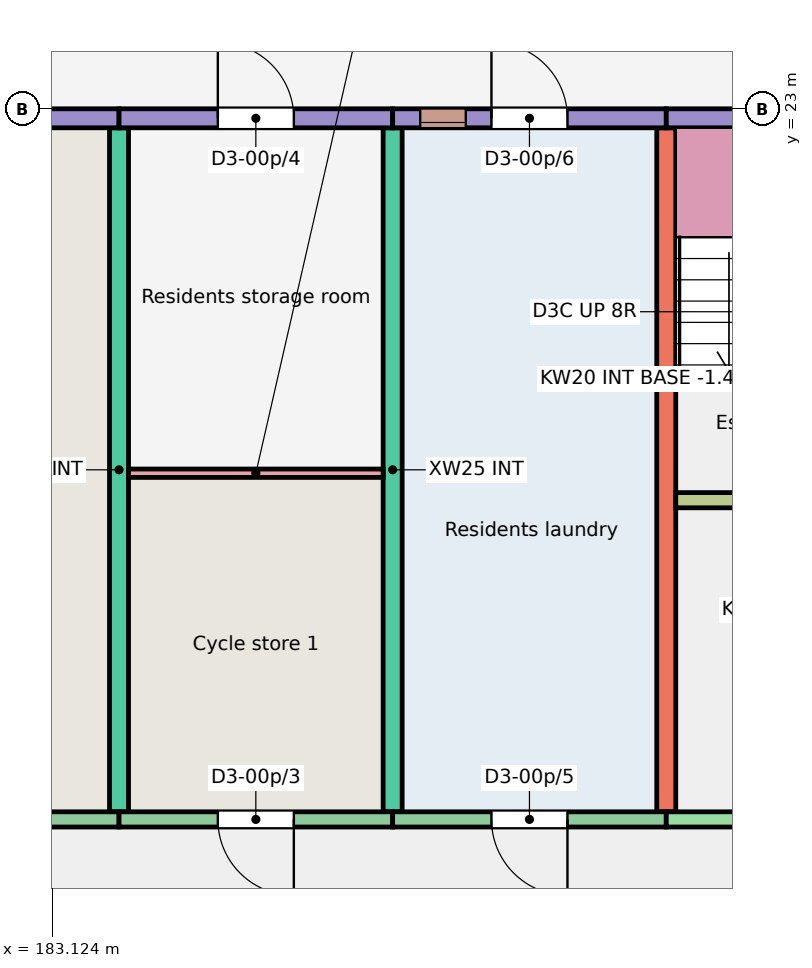
"""IFC4 building model, lengths in metres.
Left out: names, types, materials, properties, quantities, classifications, styles, units other than length and angle.
Written with IfcOpenShell. Run it as: python <this file> out.ifc"""

import sys

from ifc_helpers import new_model, si_unit, direction, frame, frame_2d, origin, place, context, subcontext, project, spatial, rectangle, extrude, element, fill, save


model = new_model("IFC4")
c1 = context("Model", 3, precision=1e-05, world=origin(), true_north=direction((0.0, 1.0)))
c2 = subcontext(c1, "Body", "Model", "MODEL_VIEW")
j1 = project(units=[si_unit("LENGTHUNIT", "METRE"), si_unit("PLANEANGLEUNIT", "RADIAN")], contexts=[c1])
p1 = place(None, origin())
s1 = spatial("IfcSite", under=j1, at=p1, CompositionType="ELEMENT")
p2 = place(p1, origin())
s2 = spatial("IfcBuilding", under=s1, at=p2, CompositionType="ELEMENT")
p3 = place(p2, origin())
s3 = spatial("IfcBuildingStorey", under=s2, at=p3, CompositionType="ELEMENT", Elevation=0.0)
for number, where, z_axis, x_axis in (
    (1, (184.0, 13.75, -0.25), (0.0, 0.0, 1.0), (0.0, 1.0, 0.0)),
    (2, (187.6, 13.75, -0.25), (0.0, 0.0, 1.0), (0.0, 1.0, 0.0)),
    (3, (191.2, 13.75, -0.25), (0.0, 0.0, 1.0), (0.0, 1.0, 0.0)),
):
    element("IfcWall", number, at=place(p3, frame(where, z_axis=z_axis, x_axis=x_axis)), inside=s3, PredefinedType="SHEAR", context=c2, shape_type="SweptSolid", body=[
        extrude(rectangle(XDim=9.0, YDim=0.25, at=frame_2d((4.5, 0.0))), origin(), (0.0, 0.0, 1.0), 3.25),
    ])
p4 = place(p3, frame((180.4, 22.875, -0.25), z_axis=(0.0, 0.0, 1.0), x_axis=(1.0, 0.0, 0.0)))
e4 = element("IfcWall", 4, at=p4, inside=s3, PredefinedType="SOLIDWALL", context=c2, shape_type="SweptSolid", body=[
    extrude(rectangle(XDim=3.6, YDim=0.25, at=frame_2d((1.8, 0.0))), origin(), (0.0, 0.0, 1.0), 3.25),
])
p5 = place(p4, frame((1.312, 0.0, 0.25)))
e5 = element("IfcOpeningElement", 5, at=p5, cuts=e4, PredefinedType="OPENING", context=c2, shape_type="SweptSolid", body=[
    extrude(rectangle(XDim=1.0, YDim=2.1, at=frame_2d((0.5, 1.05))), frame((0.0, 0.135, 0.0), z_axis=(0.0, -1.0, 0.0), x_axis=(1.0, 0.0, 0.0)), (0.0, 0.0, 1.0), 0.27),
])
p6 = place(p3, frame((180.55, 13.65, -0.25), z_axis=(0.0, 0.0, 1.0), x_axis=(1.0, 0.0, 0.0)))
e6 = element("IfcWall", 6, at=p6, inside=s3, PredefinedType="SOLIDWALL", context=c2, shape_type="SweptSolid", body=[
    extrude(rectangle(XDim=3.45, YDim=0.2, at=frame_2d((1.725, 0.0))), origin(), (0.0, 0.0, 1.0), 3.25),
])
p7 = place(p6, frame((1.163, 0.0, 0.25)))
e7 = element("IfcOpeningElement", 7, at=p7, cuts=e6, PredefinedType="OPENING", context=c2, shape_type="SweptSolid", body=[
    extrude(rectangle(XDim=1.0, YDim=2.1, at=frame_2d((0.5, 1.05))), frame((0.0, 0.11, 0.0), z_axis=(0.0, -1.0, 0.0), x_axis=(1.0, 0.0, 0.0)), (0.0, 0.0, 1.0), 0.22),
])
p8 = place(p3, frame((184.0, 22.875, -0.25), z_axis=(0.0, 0.0, 1.0), x_axis=(1.0, 0.0, 0.0)))
e8 = element("IfcWall", 8, at=p8, inside=s3, PredefinedType="SOLIDWALL", context=c2, shape_type="SweptSolid", body=[
    extrude(rectangle(XDim=3.6, YDim=0.25, at=frame_2d((1.8, 0.0))), origin(), (0.0, 0.0, 1.0), 3.25),
])
p9 = place(p8, frame((1.3, 0.0, 0.25)))
e9 = element("IfcOpeningElement", 9, at=p9, cuts=e8, PredefinedType="OPENING", context=c2, shape_type="SweptSolid", body=[
    extrude(rectangle(XDim=1.0, YDim=2.1, at=frame_2d((0.5, 1.05))), frame((0.0, 0.135, 0.0), z_axis=(0.0, -1.0, 0.0), x_axis=(1.0, 0.0, 0.0)), (0.0, 0.0, 1.0), 0.27),
])
p10 = place(p3, frame((184.0, 13.65, -0.25), z_axis=(0.0, 0.0, 1.0), x_axis=(1.0, 0.0, 0.0)))
e10 = element("IfcWall", 10, at=p10, inside=s3, PredefinedType="SOLIDWALL", context=c2, shape_type="SweptSolid", body=[
    extrude(rectangle(XDim=3.6, YDim=0.2, at=frame_2d((1.8, 0.0))), origin(), (0.0, 0.0, 1.0), 3.25),
])
p11 = place(p10, frame((1.3, 0.0, 0.25)))
e11 = element("IfcOpeningElement", 11, at=p11, cuts=e10, PredefinedType="OPENING", context=c2, shape_type="SweptSolid", body=[
    extrude(rectangle(XDim=1.0, YDim=2.1, at=frame_2d((0.5, 1.05))), frame((0.0, 0.11, 0.0), z_axis=(0.0, -1.0, 0.0), x_axis=(1.0, 0.0, 0.0)), (0.0, 0.0, 1.0), 0.22),
])
p12 = place(p3, frame((187.6, 22.875, -0.25), z_axis=(0.0, 0.0, 1.0), x_axis=(1.0, 0.0, 0.0)))
e12 = element("IfcWall", 12, at=p12, inside=s3, PredefinedType="SOLIDWALL", context=c2, shape_type="SweptSolid", body=[
    extrude(rectangle(XDim=3.6, YDim=0.25, at=frame_2d((1.8, 0.0))), origin(), (0.0, 0.0, 1.0), 3.25),
])
p13 = place(p12, frame((0.363, 0.0, 2.05)))
e13 = element("IfcOpeningElement", 13, at=p13, cuts=e12, PredefinedType="OPENING", context=c2, shape_type="SweptSolid", body=[
    extrude(rectangle(XDim=0.6, YDim=0.6, at=frame_2d((0.3, 0.3))), frame((0.0, 0.135, 0.0), z_axis=(0.0, -1.0, 0.0), x_axis=(1.0, 0.0, 0.0)), (0.0, 0.0, 1.0), 0.27),
])
p14 = place(p12, frame((1.3, 0.0, 0.25)))
e14 = element("IfcOpeningElement", 14, at=p14, cuts=e12, PredefinedType="OPENING", context=c2, shape_type="SweptSolid", body=[
    extrude(rectangle(XDim=1.0, YDim=2.1, at=frame_2d((0.5, 1.05))), frame((0.0, 0.135, 0.0), z_axis=(0.0, -1.0, 0.0), x_axis=(1.0, 0.0, 0.0)), (0.0, 0.0, 1.0), 0.27),
])
p15 = place(p3, frame((187.6, 13.65, -0.25), z_axis=(0.0, 0.0, 1.0), x_axis=(1.0, 0.0, 0.0)))
e15 = element("IfcWall", 15, at=p15, inside=s3, PredefinedType="SOLIDWALL", context=c2, shape_type="SweptSolid", body=[
    extrude(rectangle(XDim=3.6, YDim=0.2, at=frame_2d((1.8, 0.0))), origin(), (0.0, 0.0, 1.0), 3.25),
])
p16 = place(p15, frame((1.3, 0.0, 0.25)))
e16 = element("IfcOpeningElement", 16, at=p16, cuts=e15, PredefinedType="OPENING", context=c2, shape_type="SweptSolid", body=[
    extrude(rectangle(XDim=1.0, YDim=2.1, at=frame_2d((0.5, 1.05))), frame((0.0, 0.11, 0.0), z_axis=(0.0, -1.0, 0.0), x_axis=(1.0, 0.0, 0.0)), (0.0, 0.0, 1.0), 0.22),
])
p17 = place(p3, frame((191.2, 22.875, -0.25), z_axis=(0.0, 0.0, 1.0), x_axis=(1.0, 0.0, 0.0)))
e17 = element("IfcWall", 17, at=p17, inside=s3, PredefinedType="SOLIDWALL", context=c2, shape_type="SweptSolid", body=[
    extrude(rectangle(XDim=6.0, YDim=0.25, at=frame_2d((3.0, 0.0))), origin(), (0.0, 0.0, 1.0), 3.25),
])
p18 = place(p17, frame((1.025, 0.0, 0.25)))
e18 = element("IfcOpeningElement", 18, at=p18, cuts=e17, PredefinedType="OPENING", context=c2, shape_type="SweptSolid", body=[
    extrude(rectangle(XDim=1.1, YDim=2.1, at=frame_2d((0.55, 1.05))), frame((0.0, 0.135, 0.0), z_axis=(0.0, -1.0, 0.0), x_axis=(1.0, 0.0, 0.0)), (0.0, 0.0, 1.0), 0.27),
])
p19 = place(p3, frame((191.2, 13.65, -0.25), z_axis=(0.0, 0.0, 1.0), x_axis=(1.0, 0.0, 0.0)))
e19 = element("IfcWall", 19, at=p19, inside=s3, PredefinedType="SHEAR", context=c2, shape_type="SweptSolid", body=[
    extrude(rectangle(XDim=5.85, YDim=0.2, at=frame_2d((2.925, 0.0))), origin(), (0.0, 0.0, 1.0), 3.25),
])
p20 = place(p19, frame((2.438, 0.0, 0.25)))
e20 = element("IfcOpeningElement", 20, at=p20, cuts=e19, PredefinedType="OPENING", context=c2, shape_type="SweptSolid", body=[
    extrude(rectangle(XDim=1.1, YDim=2.1, at=frame_2d((0.55, 1.05))), frame((0.0, 0.11, 0.0), z_axis=(0.0, -1.0, 0.0), x_axis=(1.0, 0.0, 0.0)), (0.0, 0.0, 1.0), 0.22),
])
p21 = place(p3, frame((191.325, 17.85, -0.25), z_axis=(0.0, 0.0, 1.0), x_axis=(1.0, 0.0, 0.0)))
e21 = element("IfcWall", 21, at=p21, inside=s3, PredefinedType="SHEAR", context=c2, shape_type="SweptSolid", body=[
    extrude(rectangle(XDim=5.725, YDim=0.2, at=frame_2d((2.863, 0.0))), origin(), (0.0, 0.0, 1.0), 3.25),
])
p22 = place(p21, frame((0.95, 0.0, 0.25)))
e22 = element("IfcOpeningElement", 22, at=p22, cuts=e21, PredefinedType="OPENING", context=c2, shape_type="SweptSolid", body=[
    extrude(rectangle(XDim=1.0, YDim=2.1, at=frame_2d((0.5, 1.05))), frame((0.0, 0.11, 0.0), z_axis=(0.0, -1.0, 0.0), x_axis=(1.0, 0.0, 0.0)), (0.0, 0.0, 1.0), 0.22),
])
p23 = place(p21, frame((3.863, 0.0, 0.25)))
e23 = element("IfcOpeningElement", 23, at=p23, cuts=e21, PredefinedType="OPENING", context=c2, shape_type="SweptSolid", body=[
    extrude(rectangle(XDim=1.1, YDim=2.1, at=frame_2d((0.55, 1.05))), frame((0.0, 0.11, 0.0), z_axis=(0.0, -1.0, 0.0), x_axis=(1.0, 0.0, 0.0)), (0.0, 0.0, 1.0), 0.22),
])
p24 = place(p3, frame((184.125, 18.205, 0.0), z_axis=(0.0, 0.0, 1.0), x_axis=(1.0, 0.0, 0.0)))
e24 = element("IfcWall", 24, at=p24, inside=s3, PredefinedType="PARTITIONING", context=c2, shape_type="SweptSolid", body=[
    extrude(rectangle(XDim=3.35, YDim=0.11, at=frame_2d((1.675, 0.0))), origin(), (0.0, 0.0, 1.0), 2.8),
])
p25 = place(p13, origin())
e25 = element("IfcWindow", 25, at=p25, inside=s3, PartitioningType="SINGLE_PANEL", PredefinedType="WINDOW", context=c2, shape_type="SweptSolid", body=[
    extrude(rectangle(XDim=0.6, YDim=0.6, at=frame_2d((0.3, 0.3))), frame((0.0, -0.025, 0.0), z_axis=(0.0, -1.0, 0.0), x_axis=(1.0, 0.0, 0.0)), (0.0, 0.0, 1.0), 0.06),
])
fill(e13, e25)
p26 = place(p11, origin())
e26 = element("IfcDoor", 26, at=p26, inside=s3, OperationType="SINGLE_SWING_RIGHT", PredefinedType="DOOR", context=c2, shape_type="SweptSolid", body=[
    extrude(rectangle(XDim=1.0, YDim=2.1, at=frame_2d((0.5, 1.05))), frame((0.0, 0.025, 0.0), z_axis=(0.0, -1.0, 0.0), x_axis=(1.0, 0.0, 0.0)), (0.0, 0.0, 1.0), 0.05),
])
fill(e11, e26)
p27 = place(p9, origin())
e27 = element("IfcDoor", 27, at=p27, inside=s3, OperationType="SINGLE_SWING_LEFT", PredefinedType="DOOR", context=c2, shape_type="SweptSolid", body=[
    extrude(rectangle(XDim=1.0, YDim=2.1, at=frame_2d((0.5, 1.05))), frame((0.0, 0.025, 0.0), z_axis=(0.0, -1.0, 0.0), x_axis=(1.0, 0.0, 0.0)), (0.0, 0.0, 1.0), 0.05),
])
fill(e9, e27)
p28 = place(p16, origin())
e28 = element("IfcDoor", 28, at=p28, inside=s3, OperationType="SINGLE_SWING_RIGHT", PredefinedType="DOOR", context=c2, shape_type="SweptSolid", body=[
    extrude(rectangle(XDim=1.0, YDim=2.1, at=frame_2d((0.5, 1.05))), frame((0.0, 0.025, 0.0), z_axis=(0.0, -1.0, 0.0), x_axis=(1.0, 0.0, 0.0)), (0.0, 0.0, 1.0), 0.05),
])
fill(e16, e28)
p29 = place(p14, origin())
e29 = element("IfcDoor", 29, at=p29, inside=s3, OperationType="SINGLE_SWING_LEFT", PredefinedType="DOOR", context=c2, shape_type="SweptSolid", body=[
    extrude(rectangle(XDim=1.0, YDim=2.1, at=frame_2d((0.5, 1.05))), frame((0.0, 0.025, 0.0), z_axis=(0.0, -1.0, 0.0), x_axis=(1.0, 0.0, 0.0)), (0.0, 0.0, 1.0), 0.05),
])
fill(e14, e29)
save(model, sys.argv[1])
